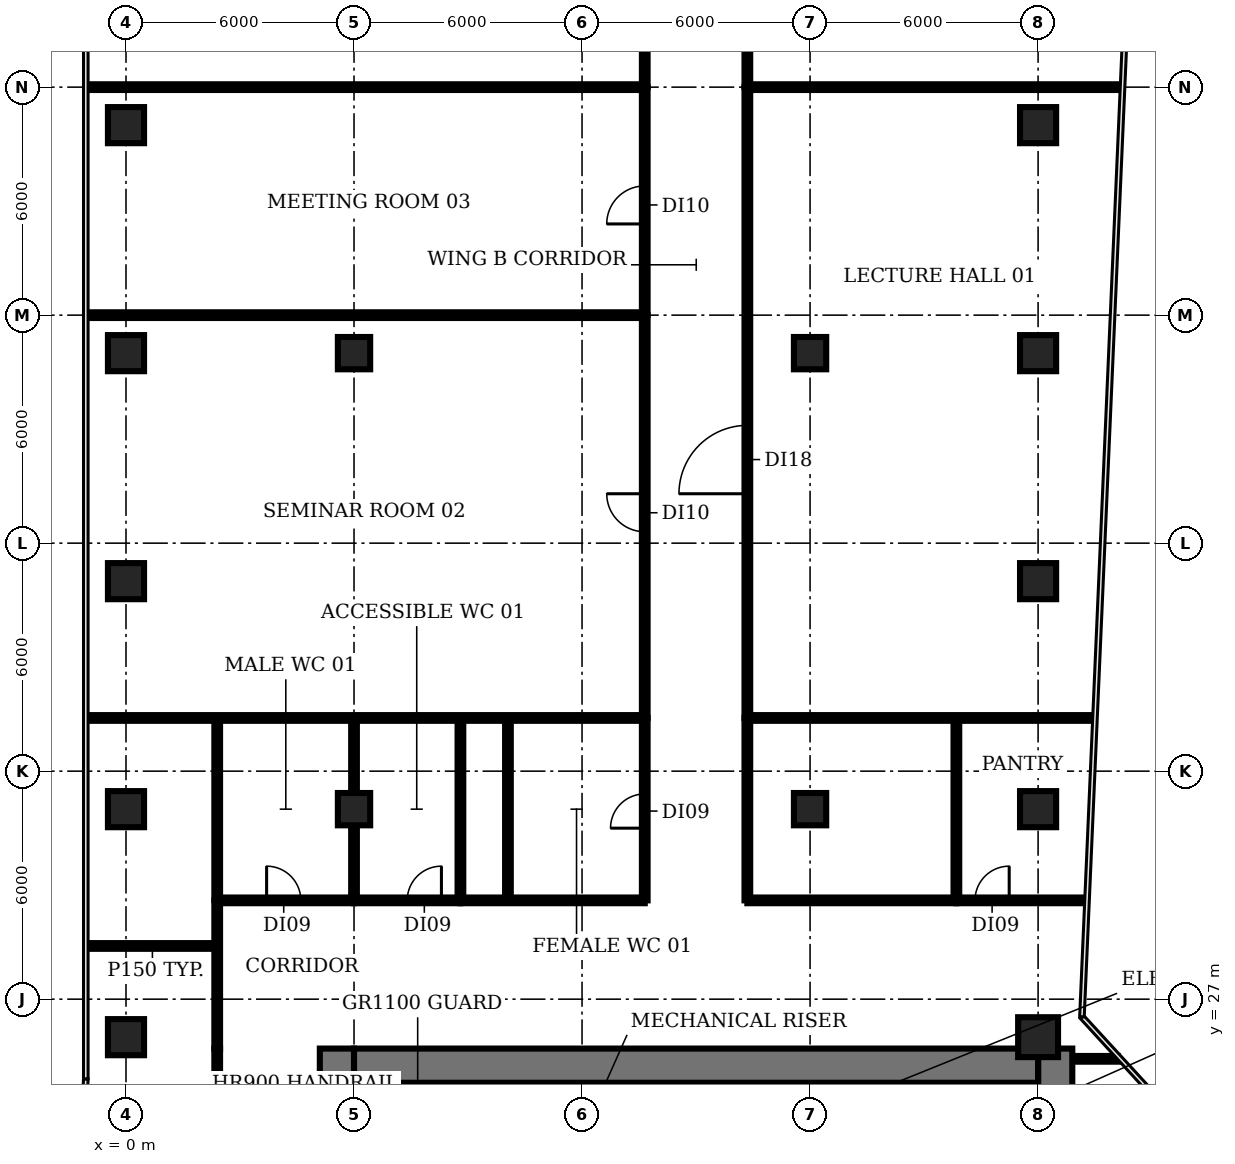
"""IFC4 building model, lengths in metres.
Left out: names, types, materials, properties, quantities, classifications, styles, units other than length and angle.
Written with IfcOpenShell. Run it as: python <this file> out.ifc"""

import sys

from ifc_helpers import new_model, si_unit, direction, frame, frame_2d, origin, origin_2d, place, context, subcontext, project, spatial, rectangle, circle, extrude, element, fill, save


model = new_model("IFC4")
c1 = context("Model", 3, precision=1e-05, world=origin(), true_north=direction((0.0, 1.0)))
c2 = subcontext(c1, "Body", "Model", "MODEL_VIEW")
j1 = project(units=[si_unit("LENGTHUNIT", "METRE"), si_unit("PLANEANGLEUNIT", "RADIAN")], contexts=[c1])
p1 = place(None, origin())
s1 = spatial("IfcSite", under=j1, at=p1, CompositionType="ELEMENT")
p2 = place(p1, origin())
s2 = spatial("IfcBuilding", under=s1, at=p2, CompositionType="ELEMENT")
p3 = place(p2, frame((0.0, 0.0, 41.6)))
s3 = spatial("IfcBuildingStorey", under=s2, at=p3, CompositionType="ELEMENT", Elevation=41.6)
for number, where, z_axis, x_axis in (
    (1, (0.0, 26.0, 0.0), (0.0, 0.0, 1.0), (1.0, 0.0, 0.0)),
    (2, (0.0, 32.0, 0.0), (0.0, 0.0, 1.0), (1.0, 0.0, 0.0)),
    (3, (0.0, 38.0, 0.0), (0.0, 0.0, 1.0), (1.0, 0.0, 0.0)),
    (4, (0.0, 44.0, 0.0), (0.0, 0.0, 1.0), (1.0, 0.0, 0.0)),
    (5, (0.0, 50.0, 0.0), (0.0, 0.0, 1.0), (1.0, 0.0, 0.0)),
):
    element("IfcColumn", number, at=place(p3, frame(where, z_axis=z_axis, x_axis=x_axis)), inside=s3, PredefinedType="COLUMN", context=c2, shape_type="SweptSolid", body=[
        extrude(rectangle(XDim=0.95, YDim=0.95, at=origin_2d()), origin(), (0.0, 0.0, 1.0), 3.85),
    ])
for number, where, z_axis, x_axis in (
    (6, (6.0, 32.0, 0.0), (0.0, 0.0, 1.0), (1.0, 0.0, 0.0)),
    (7, (6.0, 44.0, 0.0), (0.0, 0.0, 1.0), (1.0, 0.0, 0.0)),
    (8, (18.0, 32.0, 0.0), (0.0, 0.0, 1.0), (1.0, 0.0, 0.0)),
    (9, (18.0, 44.0, 0.0), (0.0, 0.0, 1.0), (1.0, 0.0, 0.0)),
):
    element("IfcColumn", number, at=place(p3, frame(where, z_axis=z_axis, x_axis=x_axis)), inside=s3, PredefinedType="COLUMN", context=c2, shape_type="SweptSolid", body=[
        extrude(rectangle(XDim=0.85, YDim=0.85, at=origin_2d()), origin(), (0.0, 0.0, 1.0), 3.85),
    ])
p4 = place(p3, frame((24.0, 26.0, 0.0), z_axis=(0.0, 0.0, 1.0), x_axis=(1.0, 0.0, 0.0)))
e10 = element("IfcColumn", 10, at=p4, inside=s3, PredefinedType="COLUMN", context=c2, shape_type="SweptSolid", body=[
    extrude(circle(Radius=0.525, at=origin_2d()), origin(), (0.0, 0.0, 1.0), 3.85),
])
for number, where, z_axis, x_axis in (
    (11, (24.0, 32.0, 0.0), (0.0, 0.0, 1.0), (1.0, 0.0, 0.0)),
    (12, (24.0, 38.0, 0.0), (0.0, 0.0, 1.0), (1.0, 0.0, 0.0)),
    (13, (24.0, 44.0, 0.0), (0.0, 0.0, 1.0), (1.0, 0.0, 0.0)),
    (14, (24.0, 50.0, 0.0), (0.0, 0.0, 1.0), (1.0, 0.0, 0.0)),
):
    element("IfcColumn", number, at=place(p3, frame(where, z_axis=z_axis, x_axis=x_axis)), inside=s3, PredefinedType="COLUMN", context=c2, shape_type="SweptSolid", body=[
        extrude(rectangle(XDim=0.95, YDim=0.95, at=origin_2d()), origin(), (0.0, 0.0, 1.0), 3.85),
    ])
p5 = place(p3, frame((9.275, 18.375, 0.0), z_axis=(0.0, 0.0, 1.0), x_axis=(0.0, 1.0, 0.0)))
e15 = element("IfcWall", 15, at=p5, inside=s3, PredefinedType="SHEAR", context=c2, shape_type="SweptSolid", body=[
    extrude(rectangle(XDim=6.425, YDim=0.25, at=frame_2d((3.212, 0.0))), origin(), (0.0, 0.0, 1.0), 3.85),
])
for number, where, z_axis, x_axis in (
    (16, (15.1, 22.9, 0.0), (0.0, 0.0, 1.0), (0.0, 1.0, 0.0)),
    (17, (20.7, 22.9, 0.0), (0.0, 0.0, 1.0), (0.0, 1.0, 0.0)),
):
    element("IfcWall", number, at=place(p3, frame(where, z_axis=z_axis, x_axis=x_axis)), inside=s3, PredefinedType="SHEAR", context=c2, shape_type="SweptSolid", body=[
        extrude(rectangle(XDim=1.9, YDim=0.2, at=frame_2d((0.95, 0.0))), origin(), (0.0, 0.0, 1.0), 3.85),
    ])
p6 = place(p3, frame((5.55, 4.5, 0.0), z_axis=(0.0, 0.0, 1.0), x_axis=(0.0, 1.0, 0.0)))
e18 = element("IfcWall", 18, at=p6, inside=s3, PredefinedType="SHEAR", context=c2, shape_type="SweptSolid", body=[
    extrude(rectangle(XDim=21.2, YDim=0.9, at=frame_2d((10.6, 0.0))), origin(), (0.0, 0.0, 1.0), 3.85),
])
p7 = place(p6, frame((1.15, 0.0, 0.0)))
e19 = element("IfcOpeningElement", 19, at=p7, cuts=e18, PredefinedType="OPENING", context=c2, shape_type="SweptSolid", body=[
    extrude(rectangle(XDim=1.5, YDim=2.1, at=frame_2d((0.75, 1.05))), frame((0.0, 0.46, 0.0), z_axis=(0.0, -1.0, 0.0), x_axis=(1.0, 0.0, 0.0)), (0.0, 0.0, 1.0), 0.92),
])
p8 = place(p6, frame((7.6, 0.0, 0.0)))
e20 = element("IfcOpeningElement", 20, at=p8, cuts=e18, PredefinedType="OPENING", context=c2, shape_type="SweptSolid", body=[
    extrude(rectangle(XDim=1.2, YDim=2.1, at=frame_2d((0.6, 1.05))), frame((0.0, 0.46, 0.0), z_axis=(0.0, -1.0, 0.0), x_axis=(1.0, 0.0, 0.0)), (0.0, 0.0, 1.0), 0.92),
])
p9 = place(p6, frame((14.15, 0.0, 0.0)))
e21 = element("IfcOpeningElement", 21, at=p9, cuts=e18, PredefinedType="OPENING", context=c2, shape_type="SweptSolid", body=[
    extrude(rectangle(XDim=1.2, YDim=2.1, at=frame_2d((0.6, 1.05))), frame((0.0, 0.46, 0.0), z_axis=(0.0, -1.0, 0.0), x_axis=(1.0, 0.0, 0.0)), (0.0, 0.0, 1.0), 0.92),
])
p10 = place(p3, frame((24.45, 25.7, 0.0), z_axis=(0.0, 0.0, 1.0), x_axis=(0.0, -1.0, 0.0)))
e22 = element("IfcWall", 22, at=p10, inside=s3, PredefinedType="SHEAR", context=c2, shape_type="SweptSolid", body=[
    extrude(rectangle(XDim=21.2, YDim=0.9, at=frame_2d((10.6, 0.0))), origin(), (0.0, 0.0, 1.0), 3.85),
])
p11 = place(p10, frame((18.55, 0.0, 0.0)))
e23 = element("IfcOpeningElement", 23, at=p11, cuts=e22, PredefinedType="OPENING", context=c2, shape_type="SweptSolid", body=[
    extrude(rectangle(XDim=1.5, YDim=2.1, at=frame_2d((0.75, 1.05))), frame((0.0, 0.46, 0.0), z_axis=(0.0, -1.0, 0.0), x_axis=(1.0, 0.0, 0.0)), (0.0, 0.0, 1.0), 0.92),
])
p12 = place(p10, frame((12.45, 0.0, 0.0)))
e24 = element("IfcOpeningElement", 24, at=p12, cuts=e22, PredefinedType="OPENING", context=c2, shape_type="SweptSolid", body=[
    extrude(rectangle(XDim=0.9, YDim=2.1, at=frame_2d((0.45, 1.05))), frame((0.0, 0.46, 0.0), z_axis=(0.0, -1.0, 0.0), x_axis=(1.0, 0.0, 0.0)), (0.0, 0.0, 1.0), 0.92),
])
p13 = place(p10, frame((6.45, 0.0, 0.0)))
e25 = element("IfcOpeningElement", 25, at=p13, cuts=e22, PredefinedType="OPENING", context=c2, shape_type="SweptSolid", body=[
    extrude(rectangle(XDim=2.0, YDim=2.1, at=frame_2d((1.0, 1.05))), frame((0.0, 0.46, 0.0), z_axis=(0.0, -1.0, 0.0), x_axis=(1.0, 0.0, 0.0)), (0.0, 0.0, 1.0), 0.92),
])
p14 = place(p3, frame((6.0, 25.25, 0.0), z_axis=(0.0, 0.0, 1.0), x_axis=(1.0, 0.0, 0.0)))
e26 = element("IfcWall", 26, at=p14, inside=s3, PredefinedType="SHEAR", context=c2, shape_type="SweptSolid", body=[
    extrude(rectangle(XDim=18.0, YDim=0.9, at=frame_2d((9.0, 0.0))), origin(), (0.0, 0.0, 1.0), 3.85),
])
p15 = place(p3, frame((-1.01, 28.4, 0.0), z_axis=(0.0, 0.0, 1.0), x_axis=(1.0, 0.0, 0.0)))
e27 = element("IfcWall", 27, at=p15, inside=s3, PredefinedType="PARTITIONING", context=c2, shape_type="SweptSolid", body=[
    extrude(rectangle(XDim=3.41, YDim=0.15, at=frame_2d((1.705, 0.0))), origin(), (0.0, 0.0, 1.0), 2.83),
])
for number, where, z_axis, x_axis in (
    (28, (-1.01, 34.4, 0.0), (0.0, 0.0, 1.0), (1.0, 0.0, 0.0)),
    (29, (-1.01, 45.0, 0.0), (0.0, 0.0, 1.0), (1.0, 0.0, 0.0)),
    (30, (-1.01, 51.0, 0.0), (0.0, 0.0, 1.0), (1.0, 0.0, 0.0)),
):
    element("IfcWall", number, at=place(p3, frame(where, z_axis=z_axis, x_axis=x_axis)), inside=s3, PredefinedType="PARTITIONING", context=c2, shape_type="SweptSolid", body=[
        extrude(rectangle(XDim=14.66, YDim=0.15, at=frame_2d((7.33, 0.0))), origin(), (0.0, 0.0, 1.0), 2.83),
    ])
p16 = place(p3, frame((2.4, 4.5, 0.0), z_axis=(0.0, 0.0, 1.0), x_axis=(0.0, 1.0, 0.0)))
e31 = element("IfcWall", 31, at=p16, inside=s3, PredefinedType="PARTITIONING", context=c2, shape_type="SweptSolid", body=[
    extrude(rectangle(XDim=21.2, YDim=0.15, at=frame_2d((10.6, 0.0))), origin(), (0.0, 0.0, 1.0), 2.83),
])
p17 = place(p16, frame((10.8, 0.0, 0.0)))
e32 = element("IfcOpeningElement", 32, at=p17, cuts=e31, PredefinedType="OPENING", context=c2, shape_type="SweptSolid", body=[
    extrude(rectangle(XDim=1.2, YDim=2.1, at=frame_2d((0.6, 1.05))), frame((0.0, 0.085, 0.0), z_axis=(0.0, -1.0, 0.0), x_axis=(1.0, 0.0, 0.0)), (0.0, 0.0, 1.0), 0.17),
])
p18 = place(p3, frame((2.4, 25.7, 0.0), z_axis=(0.0, 0.0, 1.0), x_axis=(0.0, 1.0, 0.0)))
e33 = element("IfcWall", 33, at=p18, inside=s3, PredefinedType="PARTITIONING", context=c2, shape_type="SweptSolid", body=[
    extrude(rectangle(XDim=3.9, YDim=0.15, at=frame_2d((1.95, 0.0))), origin(), (0.0, 0.0, 1.0), 2.83),
])
p19 = place(p3, frame((2.4, 29.6, 0.0), z_axis=(0.0, 0.0, 1.0), x_axis=(0.0, 1.0, 0.0)))
e34 = element("IfcWall", 34, at=p19, inside=s3, PredefinedType="PARTITIONING", context=c2, shape_type="SweptSolid", body=[
    extrude(rectangle(XDim=4.8, YDim=0.15, at=frame_2d((2.4, 0.0))), origin(), (0.0, 0.0, 1.0), 2.83),
])
p20 = place(p3, frame((2.4, 29.6, 0.0), z_axis=(0.0, 0.0, 1.0), x_axis=(1.0, 0.0, 0.0)))
e35 = element("IfcWall", 35, at=p20, inside=s3, PredefinedType="PARTITIONING", context=c2, shape_type="SweptSolid", body=[
    extrude(rectangle(XDim=3.6, YDim=0.15, at=frame_2d((1.8, 0.0))), origin(), (0.0, 0.0, 1.0), 2.83),
])
p21 = place(p20, frame((1.3, 0.0, 0.0)))
e36 = element("IfcOpeningElement", 36, at=p21, cuts=e35, PredefinedType="OPENING", context=c2, shape_type="SweptSolid", body=[
    extrude(rectangle(XDim=0.9, YDim=2.1, at=frame_2d((0.45, 1.05))), frame((0.0, 0.085, 0.0), z_axis=(0.0, -1.0, 0.0), x_axis=(1.0, 0.0, 0.0)), (0.0, 0.0, 1.0), 0.17),
])
p22 = place(p3, frame((6.0, 29.6, 0.0), z_axis=(0.0, 0.0, 1.0), x_axis=(0.0, 1.0, 0.0)))
e37 = element("IfcWall", 37, at=p22, inside=s3, PredefinedType="PARTITIONING", context=c2, shape_type="SweptSolid", body=[
    extrude(rectangle(XDim=4.8, YDim=0.15, at=frame_2d((2.4, 0.0))), origin(), (0.0, 0.0, 1.0), 2.83),
])
p23 = place(p3, frame((6.0, 29.6, 0.0), z_axis=(0.0, 0.0, 1.0), x_axis=(1.0, 0.0, 0.0)))
e38 = element("IfcWall", 38, at=p23, inside=s3, PredefinedType="PARTITIONING", context=c2, shape_type="SweptSolid", body=[
    extrude(rectangle(XDim=2.8, YDim=0.15, at=frame_2d((1.4, 0.0))), origin(), (0.0, 0.0, 1.0), 2.83),
])
p24 = place(p23, frame((1.4, 0.0, 0.0)))
e39 = element("IfcOpeningElement", 39, at=p24, cuts=e38, PredefinedType="OPENING", context=c2, shape_type="SweptSolid", body=[
    extrude(rectangle(XDim=0.9, YDim=2.1, at=frame_2d((0.45, 1.05))), frame((0.0, 0.085, 0.0), z_axis=(0.0, -1.0, 0.0), x_axis=(1.0, 0.0, 0.0)), (0.0, 0.0, 1.0), 0.17),
])
p25 = place(p3, frame((8.8, 29.6, 0.0), z_axis=(0.0, 0.0, 1.0), x_axis=(0.0, 1.0, 0.0)))
e40 = element("IfcWall", 40, at=p25, inside=s3, PredefinedType="PARTITIONING", context=c2, shape_type="SweptSolid", body=[
    extrude(rectangle(XDim=4.8, YDim=0.15, at=frame_2d((2.4, 0.0))), origin(), (0.0, 0.0, 1.0), 2.83),
])
p26 = place(p3, frame((8.8, 29.6, 0.0), z_axis=(0.0, 0.0, 1.0), x_axis=(1.0, 0.0, 0.0)))
e41 = element("IfcWall", 41, at=p26, inside=s3, PredefinedType="PARTITIONING", context=c2, shape_type="SweptSolid", body=[
    extrude(rectangle(XDim=4.85, YDim=0.15, at=frame_2d((2.425, 0.0))), origin(), (0.0, 0.0, 1.0), 2.83),
])
p27 = place(p3, frame((10.05, 29.6, 0.0), z_axis=(0.0, 0.0, 1.0), x_axis=(0.0, 1.0, 0.0)))
e42 = element("IfcWall", 42, at=p27, inside=s3, PredefinedType="PARTITIONING", context=c2, shape_type="SweptSolid", body=[
    extrude(rectangle(XDim=4.8, YDim=0.15, at=frame_2d((2.4, 0.0))), origin(), (0.0, 0.0, 1.0), 2.83),
])
p28 = place(p3, frame((13.65, 29.6, 0.0), z_axis=(0.0, 0.0, 1.0), x_axis=(0.0, 1.0, 0.0)))
e43 = element("IfcWall", 43, at=p28, inside=s3, PredefinedType="PARTITIONING", context=c2, shape_type="SweptSolid", body=[
    extrude(rectangle(XDim=4.8, YDim=0.15, at=frame_2d((2.4, 0.0))), origin(), (0.0, 0.0, 1.0), 2.83),
])
p29 = place(p28, frame((1.9, 0.0, 0.0)))
e44 = element("IfcOpeningElement", 44, at=p29, cuts=e43, PredefinedType="OPENING", context=c2, shape_type="SweptSolid", body=[
    extrude(rectangle(XDim=0.9, YDim=2.1, at=frame_2d((0.45, 1.05))), frame((0.0, 0.085, 0.0), z_axis=(0.0, -1.0, 0.0), x_axis=(1.0, 0.0, 0.0)), (0.0, 0.0, 1.0), 0.17),
])
p30 = place(p3, frame((13.65, 34.4, 0.0), z_axis=(0.0, 0.0, 1.0), x_axis=(0.0, 1.0, 0.0)))
e45 = element("IfcWall", 45, at=p30, inside=s3, PredefinedType="PARTITIONING", context=c2, shape_type="SweptSolid", body=[
    extrude(rectangle(XDim=10.6, YDim=0.15, at=frame_2d((5.3, 0.0))), origin(), (0.0, 0.0, 1.0), 2.83),
])
p31 = place(p30, frame((4.9, 0.0, 0.0)))
e46 = element("IfcOpeningElement", 46, at=p31, cuts=e45, PredefinedType="OPENING", context=c2, shape_type="SweptSolid", body=[
    extrude(rectangle(XDim=1.0, YDim=2.1, at=frame_2d((0.5, 1.05))), frame((0.0, 0.085, 0.0), z_axis=(0.0, -1.0, 0.0), x_axis=(1.0, 0.0, 0.0)), (0.0, 0.0, 1.0), 0.17),
])
p32 = place(p3, frame((13.65, 45.0, 0.0), z_axis=(0.0, 0.0, 1.0), x_axis=(0.0, 1.0, 0.0)))
e47 = element("IfcWall", 47, at=p32, inside=s3, PredefinedType="PARTITIONING", context=c2, shape_type="SweptSolid", body=[
    extrude(rectangle(XDim=6.0, YDim=0.15, at=frame_2d((3.0, 0.0))), origin(), (0.0, 0.0, 1.0), 2.83),
])
p33 = place(p32, frame((2.4, 0.0, 0.0)))
e48 = element("IfcOpeningElement", 48, at=p33, cuts=e47, PredefinedType="OPENING", context=c2, shape_type="SweptSolid", body=[
    extrude(rectangle(XDim=1.0, YDim=2.1, at=frame_2d((0.5, 1.05))), frame((0.0, 0.085, 0.0), z_axis=(0.0, -1.0, 0.0), x_axis=(1.0, 0.0, 0.0)), (0.0, 0.0, 1.0), 0.17),
])
p34 = place(p3, frame((13.65, 51.0, 0.0), z_axis=(0.0, 0.0, 1.0), x_axis=(0.0, 1.0, 0.0)))
e49 = element("IfcWall", 49, at=p34, inside=s3, PredefinedType="PARTITIONING", context=c2, shape_type="SweptSolid", body=[
    extrude(rectangle(XDim=6.0, YDim=0.15, at=frame_2d((3.0, 0.0))), origin(), (0.0, 0.0, 1.0), 2.83),
])
p35 = place(p34, frame((2.4, 0.0, 0.0)))
e50 = element("IfcOpeningElement", 50, at=p35, cuts=e49, PredefinedType="OPENING", context=c2, shape_type="SweptSolid", body=[
    extrude(rectangle(XDim=1.0, YDim=2.1, at=frame_2d((0.5, 1.05))), frame((0.0, 0.085, 0.0), z_axis=(0.0, -1.0, 0.0), x_axis=(1.0, 0.0, 0.0)), (0.0, 0.0, 1.0), 0.17),
])
p36 = place(p3, frame((16.35, 29.6, 0.0), z_axis=(0.0, 0.0, 1.0), x_axis=(0.0, 1.0, 0.0)))
e51 = element("IfcWall", 51, at=p36, inside=s3, PredefinedType="PARTITIONING", context=c2, shape_type="SweptSolid", body=[
    extrude(rectangle(XDim=4.8, YDim=0.15, at=frame_2d((2.4, 0.0))), origin(), (0.0, 0.0, 1.0), 2.83),
])
p37 = place(p3, frame((16.35, 29.6, 0.0), z_axis=(0.0, 0.0, 1.0), x_axis=(1.0, 0.0, 0.0)))
e52 = element("IfcWall", 52, at=p37, inside=s3, PredefinedType="PARTITIONING", context=c2, shape_type="SweptSolid", body=[
    extrude(rectangle(XDim=5.5, YDim=0.15, at=frame_2d((2.75, 0.0))), origin(), (0.0, 0.0, 1.0), 2.83),
])
p38 = place(p3, frame((16.35, 34.4, 0.0), z_axis=(0.0, 0.0, 1.0), x_axis=(0.0, 1.0, 0.0)))
e53 = element("IfcWall", 53, at=p38, inside=s3, PredefinedType="PARTITIONING", context=c2, shape_type="SweptSolid", body=[
    extrude(rectangle(XDim=16.6, YDim=0.15, at=frame_2d((8.3, 0.0))), origin(), (0.0, 0.0, 1.0), 2.83),
])
p39 = place(p38, frame((5.9, 0.0, 0.0)))
e54 = element("IfcOpeningElement", 54, at=p39, cuts=e53, PredefinedType="OPENING", context=c2, shape_type="SweptSolid", body=[
    extrude(rectangle(XDim=1.8, YDim=2.1, at=frame_2d((0.9, 1.05))), frame((0.0, 0.085, 0.0), z_axis=(0.0, -1.0, 0.0), x_axis=(1.0, 0.0, 0.0)), (0.0, 0.0, 1.0), 0.17),
])
p40 = place(p3, frame((16.35, 34.4, 0.0), z_axis=(0.0, 0.0, 1.0), x_axis=(1.0, 0.0, 0.0)))
e55 = element("IfcWall", 55, at=p40, inside=s3, PredefinedType="PARTITIONING", context=c2, shape_type="SweptSolid", body=[
    extrude(rectangle(XDim=9.1, YDim=0.15, at=frame_2d((4.55, 0.0))), origin(), (0.0, 0.0, 1.0), 2.83),
])
p41 = place(p3, frame((16.35, 51.0, 0.0), z_axis=(0.0, 0.0, 1.0), x_axis=(1.0, 0.0, 0.0)))
e56 = element("IfcWall", 56, at=p41, inside=s3, PredefinedType="PARTITIONING", context=c2, shape_type="SweptSolid", body=[
    extrude(rectangle(XDim=9.804, YDim=0.15, at=frame_2d((4.902, 0.0))), origin(), (0.0, 0.0, 1.0), 2.83),
])
p42 = place(p3, frame((16.35, 63.154, 0.0), z_axis=(0.0, 0.0, 1.0), x_axis=(0.0, -1.0, 0.0)))
e57 = element("IfcWall", 57, at=p42, inside=s3, PredefinedType="PARTITIONING", context=c2, shape_type="SweptSolid", body=[
    extrude(rectangle(XDim=12.154, YDim=0.15, at=frame_2d((6.077, 0.0))), origin(), (0.0, 0.0, 1.0), 2.83),
])
p43 = place(p42, frame((4.054, 0.0, 0.0)))
e58 = element("IfcOpeningElement", 58, at=p43, cuts=e57, PredefinedType="OPENING", context=c2, shape_type="SweptSolid", body=[
    extrude(rectangle(XDim=1.0, YDim=2.1, at=frame_2d((0.5, 1.05))), frame((0.0, 0.085, 0.0), z_axis=(0.0, -1.0, 0.0), x_axis=(1.0, 0.0, 0.0)), (0.0, 0.0, 1.0), 0.17),
])
p44 = place(p3, frame((21.85, 29.6, 0.0), z_axis=(0.0, 0.0, 1.0), x_axis=(0.0, 1.0, 0.0)))
e59 = element("IfcWall", 59, at=p44, inside=s3, PredefinedType="PARTITIONING", context=c2, shape_type="SweptSolid", body=[
    extrude(rectangle(XDim=4.8, YDim=0.15, at=frame_2d((2.4, 0.0))), origin(), (0.0, 0.0, 1.0), 2.83),
])
p45 = place(p3, frame((21.85, 29.6, 0.0), z_axis=(0.0, 0.0, 1.0), x_axis=(1.0, 0.0, 0.0)))
e60 = element("IfcWall", 60, at=p45, inside=s3, PredefinedType="PARTITIONING", context=c2, shape_type="SweptSolid", body=[
    extrude(rectangle(XDim=3.39, YDim=0.15, at=frame_2d((1.695, 0.0))), origin(), (0.0, 0.0, 1.0), 2.83),
])
p46 = place(p45, frame((0.49, 0.0, 0.0)))
e61 = element("IfcOpeningElement", 61, at=p46, cuts=e60, PredefinedType="OPENING", context=c2, shape_type="SweptSolid", body=[
    extrude(rectangle(XDim=0.9, YDim=2.1, at=frame_2d((0.45, 1.05))), frame((0.0, 0.085, 0.0), z_axis=(0.0, -1.0, 0.0), x_axis=(1.0, 0.0, 0.0)), (0.0, 0.0, 1.0), 0.17),
])
p47 = place(p3, frame((25.0, 25.43, 0.0), z_axis=(0.0, 0.0, 1.0), x_axis=(1.0, 0.0, 0.0)))
e62 = element("IfcWall", 62, at=p47, inside=s3, PredefinedType="PARTITIONING", context=c2, shape_type="SweptSolid", body=[
    extrude(rectangle(XDim=1.1, YDim=0.15, at=frame_2d((0.55, 0.0))), origin(), (0.0, 0.0, 1.0), 2.83),
])
p48 = place(p21, origin())
e63 = element("IfcDoor", 63, at=p48, inside=s3, OperationType="SINGLE_SWING_LEFT", PredefinedType="DOOR", context=c2, shape_type="SweptSolid", body=[
    extrude(rectangle(XDim=0.9, YDim=2.1, at=frame_2d((0.45, 1.05))), frame((0.0, 0.025, 0.0), z_axis=(0.0, -1.0, 0.0), x_axis=(1.0, 0.0, 0.0)), (0.0, 0.0, 1.0), 0.05),
])
fill(e36, e63)
p49 = place(p24, origin())
e64 = element("IfcDoor", 64, at=p49, inside=s3, OperationType="SINGLE_SWING_RIGHT", PredefinedType="DOOR", context=c2, shape_type="SweptSolid", body=[
    extrude(rectangle(XDim=0.9, YDim=2.1, at=frame_2d((0.45, 1.05))), frame((0.0, 0.025, 0.0), z_axis=(0.0, -1.0, 0.0), x_axis=(1.0, 0.0, 0.0)), (0.0, 0.0, 1.0), 0.05),
])
fill(e39, e64)
p50 = place(p29, origin())
e65 = element("IfcDoor", 65, at=p50, inside=s3, OperationType="SINGLE_SWING_LEFT", PredefinedType="DOOR", context=c2, shape_type="SweptSolid", body=[
    extrude(rectangle(XDim=0.9, YDim=2.1, at=frame_2d((0.45, 1.05))), frame((0.0, 0.025, 0.0), z_axis=(0.0, -1.0, 0.0), x_axis=(1.0, 0.0, 0.0)), (0.0, 0.0, 1.0), 0.05),
])
fill(e44, e65)
p51 = place(p31, origin())
e66 = element("IfcDoor", 66, at=p51, inside=s3, OperationType="SINGLE_SWING_RIGHT", PredefinedType="DOOR", context=c2, shape_type="SweptSolid", body=[
    extrude(rectangle(XDim=1.0, YDim=2.1, at=frame_2d((0.5, 1.05))), frame((0.0, 0.025, 0.0), z_axis=(0.0, -1.0, 0.0), x_axis=(1.0, 0.0, 0.0)), (0.0, 0.0, 1.0), 0.05),
])
fill(e46, e66)
p52 = place(p33, origin())
e67 = element("IfcDoor", 67, at=p52, inside=s3, OperationType="SINGLE_SWING_LEFT", PredefinedType="DOOR", context=c2, shape_type="SweptSolid", body=[
    extrude(rectangle(XDim=1.0, YDim=2.1, at=frame_2d((0.5, 1.05))), frame((0.0, 0.025, 0.0), z_axis=(0.0, -1.0, 0.0), x_axis=(1.0, 0.0, 0.0)), (0.0, 0.0, 1.0), 0.05),
])
fill(e48, e67)
p53 = place(p39, origin())
e68 = element("IfcDoor", 68, at=p53, inside=s3, OperationType="SINGLE_SWING_LEFT", PredefinedType="DOOR", context=c2, shape_type="SweptSolid", body=[
    extrude(rectangle(XDim=1.8, YDim=2.1, at=frame_2d((0.9, 1.05))), frame((0.0, 0.025, 0.0), z_axis=(0.0, -1.0, 0.0), x_axis=(1.0, 0.0, 0.0)), (0.0, 0.0, 1.0), 0.05),
])
fill(e54, e68)
p54 = place(p46, origin())
e69 = element("IfcDoor", 69, at=p54, inside=s3, OperationType="SINGLE_SWING_RIGHT", PredefinedType="DOOR", context=c2, shape_type="SweptSolid", body=[
    extrude(rectangle(XDim=0.9, YDim=2.1, at=frame_2d((0.45, 1.05))), frame((0.0, 0.025, 0.0), z_axis=(0.0, -1.0, 0.0), x_axis=(1.0, 0.0, 0.0)), (0.0, 0.0, 1.0), 0.05),
])
fill(e61, e69)
save(model, sys.argv[1])
